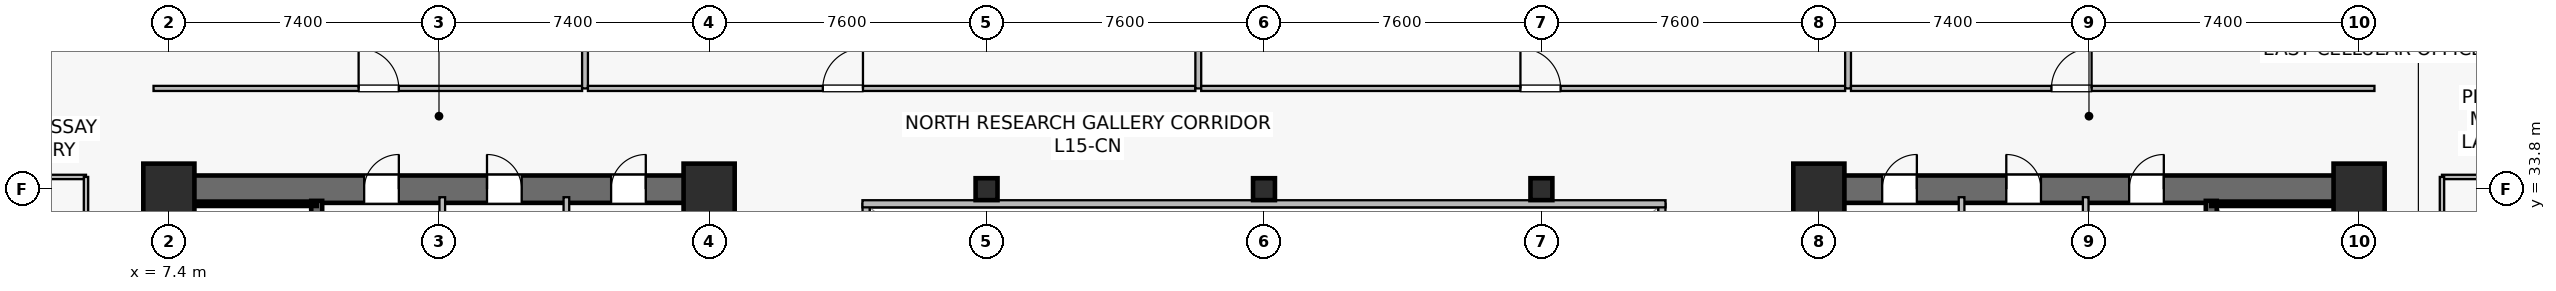
"""IFC4 building model, lengths in metres.
Left out: names, types, materials, properties, quantities, classifications, styles, units other than length and angle.
Written with IfcOpenShell. Run it as: python <this file> out.ifc"""

import sys

from ifc_helpers import new_model, si_unit, direction, frame, frame_2d, origin, origin_2d, place, context, subcontext, project, spatial, rectangle, hollow_rectangle, extrude, source, transform, mapped, element, fill, save


model = new_model("IFC4")
c1 = context("Model", 3, precision=1e-05, world=origin(), true_north=direction((0.0, 1.0)))
c2 = subcontext(c1, "Body", "Model", "MODEL_VIEW")
j1 = project(units=[si_unit("LENGTHUNIT", "METRE"), si_unit("PLANEANGLEUNIT", "RADIAN")], contexts=[c1])
p1 = place(None, origin())
s1 = spatial("IfcSite", under=j1, at=p1, CompositionType="ELEMENT")
p2 = place(p1, origin())
s2 = spatial("IfcBuilding", under=s1, at=p2, CompositionType="ELEMENT")
p3 = place(p2, frame((0.0, 0.0, 62.1)))
s3 = spatial("IfcBuildingStorey", under=s2, at=p3, CompositionType="ELEMENT", Elevation=62.1)
p4 = place(p3, frame((7.025, 33.8, 0.0), z_axis=(0.0, 0.0, 1.0), x_axis=(1.0, 0.0, 0.0)))
e1 = element("IfcWall", 1, at=p4, inside=s3, PredefinedType="SHEAR", context=c2, shape_type="SweptSolid", body=[
    extrude(rectangle(XDim=15.55, YDim=0.75, at=frame_2d((7.775, 0.0))), origin(), (0.0, 0.0, 1.0), 3.78),
])
p5 = place(p4, frame((5.725, 0.0, 0.0)))
e2 = element("IfcOpeningElement", 2, at=p5, cuts=e1, PredefinedType="OPENING", context=c2, shape_type="SweptSolid", body=[
    extrude(rectangle(XDim=0.95, YDim=2.15, at=frame_2d((0.475, 1.075))), frame((0.0, 0.385, 0.0), z_axis=(0.0, -1.0, 0.0), x_axis=(1.0, 0.0, 0.0)), (0.0, 0.0, 1.0), 0.77),
])
p6 = place(p4, frame((9.09, 0.0, 0.0)))
e3 = element("IfcOpeningElement", 3, at=p6, cuts=e1, PredefinedType="OPENING", context=c2, shape_type="SweptSolid", body=[
    extrude(rectangle(XDim=0.95, YDim=2.15, at=frame_2d((0.475, 1.075))), frame((0.0, 0.385, 0.0), z_axis=(0.0, -1.0, 0.0), x_axis=(1.0, 0.0, 0.0)), (0.0, 0.0, 1.0), 0.77),
])
p7 = place(p4, frame((12.49, 0.0, 0.0)))
e4 = element("IfcOpeningElement", 4, at=p7, cuts=e1, PredefinedType="OPENING", context=c2, shape_type="SweptSolid", body=[
    extrude(rectangle(XDim=0.95, YDim=2.15, at=frame_2d((0.475, 1.075))), frame((0.0, 0.385, 0.0), z_axis=(0.0, -1.0, 0.0), x_axis=(1.0, 0.0, 0.0)), (0.0, 0.0, 1.0), 0.77),
])
p8 = place(p3, frame((7.4, 15.175, 0.0), z_axis=(0.0, 0.0, 1.0), x_axis=(0.0, 1.0, 0.0)))
e5 = element("IfcWall", 5, at=p8, inside=s3, PredefinedType="SHEAR", context=c2, shape_type="SweptSolid", body=[
    extrude(rectangle(XDim=18.25, YDim=0.75, at=frame_2d((9.125, 0.0))), origin(), (0.0, 0.0, 1.0), 3.78),
])
p9 = place(p3, frame((22.2, 15.175, 0.0), z_axis=(0.0, 0.0, 1.0), x_axis=(0.0, 1.0, 0.0)))
e6 = element("IfcWall", 6, at=p9, inside=s3, PredefinedType="SHEAR", context=c2, shape_type="SweptSolid", body=[
    extrude(rectangle(XDim=18.25, YDim=0.75, at=frame_2d((9.125, 0.0))), origin(), (0.0, 0.0, 1.0), 3.78),
])
p10 = place(p9, frame((3.375, 0.0, 0.0)))
e7 = element("IfcOpeningElement", 7, at=p10, cuts=e6, PredefinedType="OPENING", context=c2, shape_type="SweptSolid", body=[
    extrude(rectangle(XDim=1.42, YDim=2.2, at=frame_2d((0.71, 1.1))), frame((0.0, 0.385, 0.0), z_axis=(0.0, -1.0, 0.0), x_axis=(1.0, 0.0, 0.0)), (0.0, 0.0, 1.0), 0.77),
])
p11 = place(p3, frame((11.45, 24.85, 0.0), z_axis=(0.0, 0.0, 1.0), x_axis=(0.0, 1.0, 0.0)))
e8 = element("IfcWall", 8, at=p11, inside=s3, PredefinedType="SHEAR", context=c2, shape_type="SweptSolid", body=[
    extrude(rectangle(XDim=8.63, YDim=0.3, at=frame_2d((4.315, 0.0))), origin(), (0.0, 0.0, 1.0), 3.78),
])
p12 = place(p11, frame((0.42, 0.0, 0.0)))
e9 = element("IfcOpeningElement", 9, at=p12, cuts=e8, PredefinedType="OPENING", context=c2, shape_type="SweptSolid", body=[
    extrude(rectangle(XDim=1.1, YDim=2.15, at=frame_2d((0.55, 1.075))), frame((0.0, 0.16, 0.0), z_axis=(0.0, -1.0, 0.0), x_axis=(1.0, 0.0, 0.0)), (0.0, 0.0, 1.0), 0.32),
])
p13 = place(p3, frame((7.73, 33.4, 0.0), z_axis=(0.0, 0.0, 1.0), x_axis=(1.0, 0.0, 0.0)))
e10 = element("IfcWall", 10, at=p13, inside=s3, PredefinedType="SOLIDWALL", context=c2, shape_type="SweptSolid", body=[
    extrude(rectangle(XDim=3.72, YDim=0.12, at=frame_2d((1.86, 0.0))), origin(), (0.0, 0.0, 1.0), 3.78),
])
p14 = place(p3, frame((52.225, 33.8, 0.0), z_axis=(0.0, 0.0, 1.0), x_axis=(1.0, 0.0, 0.0)))
e11 = element("IfcWall", 11, at=p14, inside=s3, PredefinedType="SHEAR", context=c2, shape_type="SweptSolid", body=[
    extrude(rectangle(XDim=15.55, YDim=0.75, at=frame_2d((7.775, 0.0))), origin(), (0.0, 0.0, 1.0), 3.78),
])
p15 = place(p14, frame((8.875, 0.0, 0.0)))
e12 = element("IfcOpeningElement", 12, at=p15, cuts=e11, PredefinedType="OPENING", context=c2, shape_type="SweptSolid", body=[
    extrude(rectangle(XDim=0.95, YDim=2.15, at=frame_2d((0.475, 1.075))), frame((0.0, 0.385, 0.0), z_axis=(0.0, -1.0, 0.0), x_axis=(1.0, 0.0, 0.0)), (0.0, 0.0, 1.0), 0.77),
])
p16 = place(p14, frame((5.51, 0.0, 0.0)))
e13 = element("IfcOpeningElement", 13, at=p16, cuts=e11, PredefinedType="OPENING", context=c2, shape_type="SweptSolid", body=[
    extrude(rectangle(XDim=0.95, YDim=2.15, at=frame_2d((0.475, 1.075))), frame((0.0, 0.385, 0.0), z_axis=(0.0, -1.0, 0.0), x_axis=(1.0, 0.0, 0.0)), (0.0, 0.0, 1.0), 0.77),
])
p17 = place(p14, frame((2.11, 0.0, 0.0)))
e14 = element("IfcOpeningElement", 14, at=p17, cuts=e11, PredefinedType="OPENING", context=c2, shape_type="SweptSolid", body=[
    extrude(rectangle(XDim=0.95, YDim=2.15, at=frame_2d((0.475, 1.075))), frame((0.0, 0.385, 0.0), z_axis=(0.0, -1.0, 0.0), x_axis=(1.0, 0.0, 0.0)), (0.0, 0.0, 1.0), 0.77),
])
p18 = place(p3, frame((52.6, 15.175, 0.0), z_axis=(0.0, 0.0, 1.0), x_axis=(0.0, 1.0, 0.0)))
e15 = element("IfcWall", 15, at=p18, inside=s3, PredefinedType="SHEAR", context=c2, shape_type="SweptSolid", body=[
    extrude(rectangle(XDim=18.25, YDim=0.75, at=frame_2d((9.125, 0.0))), origin(), (0.0, 0.0, 1.0), 3.78),
])
p19 = place(p18, frame((3.375, 0.0, 0.0)))
e16 = element("IfcOpeningElement", 16, at=p19, cuts=e15, PredefinedType="OPENING", context=c2, shape_type="SweptSolid", body=[
    extrude(rectangle(XDim=1.42, YDim=2.2, at=frame_2d((0.71, 1.1))), frame((0.0, 0.385, 0.0), z_axis=(0.0, -1.0, 0.0), x_axis=(1.0, 0.0, 0.0)), (0.0, 0.0, 1.0), 0.77),
])
p20 = place(p3, frame((67.4, 15.175, 0.0), z_axis=(0.0, 0.0, 1.0), x_axis=(0.0, 1.0, 0.0)))
e17 = element("IfcWall", 17, at=p20, inside=s3, PredefinedType="SHEAR", context=c2, shape_type="SweptSolid", body=[
    extrude(rectangle(XDim=18.25, YDim=0.75, at=frame_2d((9.125, 0.0))), origin(), (0.0, 0.0, 1.0), 3.78),
])
p21 = place(p3, frame((63.35, 24.85, 0.0), z_axis=(0.0, 0.0, 1.0), x_axis=(0.0, 1.0, 0.0)))
e18 = element("IfcWall", 18, at=p21, inside=s3, PredefinedType="SHEAR", context=c2, shape_type="SweptSolid", body=[
    extrude(rectangle(XDim=8.63, YDim=0.3, at=frame_2d((4.315, 0.0))), origin(), (0.0, 0.0, 1.0), 3.78),
])
p22 = place(p21, frame((0.42, 0.0, 0.0)))
e19 = element("IfcOpeningElement", 19, at=p22, cuts=e18, PredefinedType="OPENING", context=c2, shape_type="SweptSolid", body=[
    extrude(rectangle(XDim=1.1, YDim=2.15, at=frame_2d((0.55, 1.075))), frame((0.0, 0.16, 0.0), z_axis=(0.0, -1.0, 0.0), x_axis=(1.0, 0.0, 0.0)), (0.0, 0.0, 1.0), 0.32),
])
p23 = place(p3, frame((63.35, 33.4, 0.0), z_axis=(0.0, 0.0, 1.0), x_axis=(1.0, 0.0, 0.0)))
e20 = element("IfcWall", 20, at=p23, inside=s3, PredefinedType="SOLIDWALL", context=c2, shape_type="SweptSolid", body=[
    extrude(rectangle(XDim=3.72, YDim=0.12, at=frame_2d((1.86, 0.0))), origin(), (0.0, 0.0, 1.0), 3.78),
])
m1 = source(origin(), c2, "Body", "SweptSolid", [
    extrude(rectangle(XDim=1.4, YDim=1.4, at=origin_2d()), origin(), (0.0, 0.0, 1.0), 4.1),
])
for number, where, z_axis, x_axis in (
    (21, (7.4, 33.8, 0.0), (0.0, 0.0, 1.0), (1.0, 0.0, 0.0)),
    (22, (22.2, 33.8, 0.0), (0.0, 0.0, 1.0), (1.0, 0.0, 0.0)),
    (23, (52.6, 33.8, 0.0), (0.0, 0.0, 1.0), (1.0, 0.0, 0.0)),
    (24, (67.4, 33.8, 0.0), (0.0, 0.0, 1.0), (1.0, 0.0, 0.0)),
):
    element("IfcColumn", number, at=place(p3, frame(where, z_axis=z_axis, x_axis=x_axis)), inside=s3, PredefinedType="COLUMN", context=c2, shape_type="MappedRepresentation", body=[
        mapped(m1, transform((0.0, 0.0, 0.0), scale=1.0)),
    ])
m2 = source(origin(), c2, "Body", "SweptSolid", [
    extrude(hollow_rectangle(XDim=0.6, YDim=0.6, WallThickness=0.028, at=origin_2d()), origin(), (0.0, 0.0, 1.0), 4.1),
])
for number, where, z_axis, x_axis in (
    (25, (29.8, 33.8, 0.0), (0.0, 0.0, 1.0), (1.0, 0.0, 0.0)),
    (26, (37.4, 33.8, 0.0), (0.0, 0.0, 1.0), (1.0, 0.0, 0.0)),
    (27, (45.0, 33.8, 0.0), (0.0, 0.0, 1.0), (1.0, 0.0, 0.0)),
):
    element("IfcColumn", number, at=place(p3, frame(where, z_axis=z_axis, x_axis=x_axis)), inside=s3, PredefinedType="COLUMN", context=c2, shape_type="MappedRepresentation", body=[
        mapped(m2, transform((0.0, 0.0, 0.0), scale=1.0)),
    ])
p24 = place(p3, frame((14.89, 29.65, 0.0), z_axis=(0.0, 0.0, 1.0), x_axis=(0.0, 1.0, 0.0)))
e28 = element("IfcWall", 28, at=p24, inside=s3, PredefinedType="PLUMBINGWALL", context=c2, shape_type="SweptSolid", body=[
    extrude(rectangle(XDim=3.93, YDim=0.155, at=frame_2d((1.965, 0.0))), origin(), (0.0, 0.0, 1.0), 3.115),
])
p25 = place(p3, frame((18.29, 29.65, 0.0), z_axis=(0.0, 0.0, 1.0), x_axis=(0.0, 1.0, 0.0)))
e29 = element("IfcWall", 29, at=p25, inside=s3, PredefinedType="PLUMBINGWALL", context=c2, shape_type="SweptSolid", body=[
    extrude(rectangle(XDim=3.93, YDim=0.155, at=frame_2d((1.965, 0.0))), origin(), (0.0, 0.0, 1.0), 3.78),
])
p26 = place(p3, frame((59.91, 29.65, 0.0), z_axis=(0.0, 0.0, 1.0), x_axis=(0.0, 1.0, 0.0)))
e30 = element("IfcWall", 30, at=p26, inside=s3, PredefinedType="PLUMBINGWALL", context=c2, shape_type="SweptSolid", body=[
    extrude(rectangle(XDim=3.93, YDim=0.155, at=frame_2d((1.965, 0.0))), origin(), (0.0, 0.0, 1.0), 3.115),
])
p27 = place(p3, frame((56.51, 29.65, 0.0), z_axis=(0.0, 0.0, 1.0), x_axis=(0.0, 1.0, 0.0)))
e31 = element("IfcWall", 31, at=p27, inside=s3, PredefinedType="PLUMBINGWALL", context=c2, shape_type="SweptSolid", body=[
    extrude(rectangle(XDim=3.93, YDim=0.155, at=frame_2d((1.965, 0.0))), origin(), (0.0, 0.0, 1.0), 3.78),
])
p28 = place(p3, frame((26.5, 15.2, 0.0), z_axis=(0.0, 0.0, 1.0), x_axis=(0.0, 1.0, 0.0)))
e32 = element("IfcWall", 32, at=p28, inside=s3, PredefinedType="SOLIDWALL", context=c2, shape_type="SweptSolid", body=[
    extrude(rectangle(XDim=18.2, YDim=0.195, at=frame_2d((9.1, 0.0))), origin(), (0.0, 0.0, 1.0), 3.78),
])
p29 = place(p28, frame((1.8, 0.0, 0.9)))
e33 = element("IfcOpeningElement", 33, at=p29, cuts=e32, PredefinedType="OPENING", context=c2, shape_type="SweptSolid", body=[
    extrude(rectangle(XDim=1.2, YDim=1.35, at=frame_2d((0.6, 0.675))), frame((0.0, 0.107, 0.0), z_axis=(0.0, -1.0, 0.0), x_axis=(1.0, 0.0, 0.0)), (0.0, 0.0, 1.0), 0.215),
])
p30 = place(p28, frame((13.2, 0.0, 0.9)))
e34 = element("IfcOpeningElement", 34, at=p30, cuts=e32, PredefinedType="OPENING", context=c2, shape_type="SweptSolid", body=[
    extrude(rectangle(XDim=1.2, YDim=1.35, at=frame_2d((0.6, 0.675))), frame((0.0, 0.107, 0.0), z_axis=(0.0, -1.0, 0.0), x_axis=(1.0, 0.0, 0.0)), (0.0, 0.0, 1.0), 0.215),
])
p31 = place(p3, frame((48.3, 15.2, 0.0), z_axis=(0.0, 0.0, 1.0), x_axis=(0.0, 1.0, 0.0)))
e35 = element("IfcWall", 35, at=p31, inside=s3, PredefinedType="SOLIDWALL", context=c2, shape_type="SweptSolid", body=[
    extrude(rectangle(XDim=18.2, YDim=0.195, at=frame_2d((9.1, 0.0))), origin(), (0.0, 0.0, 1.0), 3.78),
])
p32 = place(p31, frame((1.8, 0.0, 0.9)))
e36 = element("IfcOpeningElement", 36, at=p32, cuts=e35, PredefinedType="OPENING", context=c2, shape_type="SweptSolid", body=[
    extrude(rectangle(XDim=1.2, YDim=1.35, at=frame_2d((0.6, 0.675))), frame((0.0, 0.107, 0.0), z_axis=(0.0, -1.0, 0.0), x_axis=(1.0, 0.0, 0.0)), (0.0, 0.0, 1.0), 0.215),
])
p33 = place(p31, frame((13.2, 0.0, 0.9)))
e37 = element("IfcOpeningElement", 37, at=p33, cuts=e35, PredefinedType="OPENING", context=c2, shape_type="SweptSolid", body=[
    extrude(rectangle(XDim=1.2, YDim=1.35, at=frame_2d((0.6, 0.675))), frame((0.0, 0.107, 0.0), z_axis=(0.0, -1.0, 0.0), x_axis=(1.0, 0.0, 0.0)), (0.0, 0.0, 1.0), 0.215),
])
p34 = place(p3, frame((26.4, 33.4, 0.0), z_axis=(0.0, 0.0, 1.0), x_axis=(1.0, 0.0, 0.0)))
e38 = element("IfcWall", 38, at=p34, inside=s3, PredefinedType="SOLIDWALL", context=c2, shape_type="SweptSolid", body=[
    extrude(rectangle(XDim=22.0, YDim=0.195, at=frame_2d((11.0, 0.0))), origin(), (0.0, 0.0, 1.0), 3.78),
])
p35 = place(p3, frame((6.98, 36.56, 0.0), z_axis=(0.0, 0.0, 1.0), x_axis=(1.0, 0.0, 0.0)))
e39 = element("IfcWall", 39, at=p35, inside=s3, PredefinedType="PARTITIONING", context=c2, shape_type="SweptSolid", body=[
    extrude(rectangle(XDim=11.74, YDim=0.14, at=frame_2d((5.87, 0.0))), origin(), (0.0, 0.0, 1.0), 3.115),
])
p36 = place(p35, frame((5.618, 0.0, 0.0)))
e40 = element("IfcOpeningElement", 40, at=p36, cuts=e39, PredefinedType="OPENING", context=c2, shape_type="SweptSolid", body=[
    extrude(rectangle(XDim=1.1, YDim=2.18, at=frame_2d((0.55, 1.09))), frame((0.0, 0.08, 0.0), z_axis=(0.0, -1.0, 0.0), x_axis=(1.0, 0.0, 0.0)), (0.0, 0.0, 1.0), 0.16),
])
p37 = place(p3, frame((18.8, 36.56, 0.0), z_axis=(0.0, 0.0, 1.0), x_axis=(0.0, 1.0, 0.0)))
e41 = element("IfcWall", 41, at=p37, inside=s3, PredefinedType="PARTITIONING", context=c2, shape_type="SweptSolid", body=[
    extrude(rectangle(XDim=11.93, YDim=0.16, at=frame_2d((5.965, 0.0))), origin(), (0.0, 0.0, 1.0), 3.015),
])
p38 = place(p3, frame((18.88, 36.56, 0.0), z_axis=(0.0, 0.0, 1.0), x_axis=(1.0, 0.0, 0.0)))
e42 = element("IfcWall", 42, at=p38, inside=s3, PredefinedType="PARTITIONING", context=c2, shape_type="SweptSolid", body=[
    extrude(rectangle(XDim=16.64, YDim=0.14, at=frame_2d((8.32, 0.0))), origin(), (0.0, 0.0, 1.0), 3.115),
])
p39 = place(p38, frame((6.434, 0.0, 0.0)))
e43 = element("IfcOpeningElement", 43, at=p39, cuts=e42, PredefinedType="OPENING", context=c2, shape_type="SweptSolid", body=[
    extrude(rectangle(XDim=1.1, YDim=2.18, at=frame_2d((0.55, 1.09))), frame((0.0, 0.08, 0.0), z_axis=(0.0, -1.0, 0.0), x_axis=(1.0, 0.0, 0.0)), (0.0, 0.0, 1.0), 0.16),
])
p40 = place(p3, frame((35.6, 36.56, 0.0), z_axis=(0.0, 0.0, 1.0), x_axis=(0.0, 1.0, 0.0)))
e44 = element("IfcWall", 44, at=p40, inside=s3, PredefinedType="PARTITIONING", context=c2, shape_type="SweptSolid", body=[
    extrude(rectangle(XDim=10.73, YDim=0.16, at=frame_2d((5.365, 0.0))), origin(), (0.0, 0.0, 1.0), 3.015),
])
p41 = place(p3, frame((35.68, 36.56, 0.0), z_axis=(0.0, 0.0, 1.0), x_axis=(1.0, 0.0, 0.0)))
e45 = element("IfcWall", 45, at=p41, inside=s3, PredefinedType="PARTITIONING", context=c2, shape_type="SweptSolid", body=[
    extrude(rectangle(XDim=17.64, YDim=0.14, at=frame_2d((8.82, 0.0))), origin(), (0.0, 0.0, 1.0), 3.115),
])
p42 = place(p41, frame((8.745, 0.0, 0.0)))
e46 = element("IfcOpeningElement", 46, at=p42, cuts=e45, PredefinedType="OPENING", context=c2, shape_type="SweptSolid", body=[
    extrude(rectangle(XDim=1.1, YDim=2.18, at=frame_2d((0.55, 1.09))), frame((0.0, 0.08, 0.0), z_axis=(0.0, -1.0, 0.0), x_axis=(1.0, 0.0, 0.0)), (0.0, 0.0, 1.0), 0.16),
])
p43 = place(p3, frame((53.4, 36.56, 0.0), z_axis=(0.0, 0.0, 1.0), x_axis=(0.0, 1.0, 0.0)))
e47 = element("IfcWall", 47, at=p43, inside=s3, PredefinedType="PARTITIONING", context=c2, shape_type="SweptSolid", body=[
    extrude(rectangle(XDim=11.93, YDim=0.16, at=frame_2d((5.965, 0.0))), origin(), (0.0, 0.0, 1.0), 3.015),
])
p44 = place(p3, frame((53.48, 36.56, 0.0), z_axis=(0.0, 0.0, 1.0), x_axis=(1.0, 0.0, 0.0)))
e48 = element("IfcWall", 48, at=p44, inside=s3, PredefinedType="PARTITIONING", context=c2, shape_type="SweptSolid", body=[
    extrude(rectangle(XDim=14.34, YDim=0.14, at=frame_2d((7.17, 0.0))), origin(), (0.0, 0.0, 1.0), 3.115),
])
p45 = place(p44, frame((5.491, 0.0, 0.0)))
e49 = element("IfcOpeningElement", 49, at=p45, cuts=e48, PredefinedType="OPENING", context=c2, shape_type="SweptSolid", body=[
    extrude(rectangle(XDim=1.1, YDim=2.18, at=frame_2d((0.55, 1.09))), frame((0.0, 0.08, 0.0), z_axis=(0.0, -1.0, 0.0), x_axis=(1.0, 0.0, 0.0)), (0.0, 0.0, 1.0), 0.16),
])
p46 = place(p3, frame((0.11, 34.135, 0.0), z_axis=(0.0, 0.0, 1.0), x_axis=(1.0, 0.0, 0.0)))
e50 = element("IfcWall", 50, at=p46, inside=s3, PredefinedType="PARTITIONING", context=c2, shape_type="SweptSolid", body=[
    extrude(rectangle(XDim=5.02, YDim=0.12, at=frame_2d((2.51, 0.0))), origin(), (0.0, 0.0, 1.0), 3.78),
])
p47 = place(p3, frame((5.13, 28.66, 0.0), z_axis=(0.0, 0.0, 1.0), x_axis=(0.0, 1.0, 0.0)))
e51 = element("IfcWall", 51, at=p47, inside=s3, PredefinedType="PARTITIONING", context=c2, shape_type="SweptSolid", body=[
    extrude(rectangle(XDim=5.475, YDim=0.12, at=frame_2d((2.738, 0.0))), origin(), (0.0, 0.0, 1.0), 3.78),
])
p48 = place(p47, frame((2.288, 0.0, 0.0)))
e52 = element("IfcOpeningElement", 52, at=p48, cuts=e51, PredefinedType="OPENING", context=c2, shape_type="SweptSolid", body=[
    extrude(rectangle(XDim=0.9, YDim=2.1, at=frame_2d((0.45, 1.05))), frame((0.0, 0.07, 0.0), z_axis=(0.0, -1.0, 0.0), x_axis=(1.0, 0.0, 0.0)), (0.0, 0.0, 1.0), 0.14),
])
p49 = place(p3, frame((69.67, 34.135, 0.0), z_axis=(0.0, 0.0, 1.0), x_axis=(1.0, 0.0, 0.0)))
e53 = element("IfcWall", 53, at=p49, inside=s3, PredefinedType="PARTITIONING", context=c2, shape_type="SweptSolid", body=[
    extrude(rectangle(XDim=5.02, YDim=0.12, at=frame_2d((2.51, 0.0))), origin(), (0.0, 0.0, 1.0), 3.78),
])
p50 = place(p3, frame((69.67, 29.46, 0.0), z_axis=(0.0, 0.0, 1.0), x_axis=(0.0, 1.0, 0.0)))
e54 = element("IfcWall", 54, at=p50, inside=s3, PredefinedType="PARTITIONING", context=c2, shape_type="SweptSolid", body=[
    extrude(rectangle(XDim=4.675, YDim=0.12, at=frame_2d((2.337, 0.0))), origin(), (0.0, 0.0, 1.0), 3.78),
])
p51 = place(p50, frame((1.887, 0.0, 0.0)))
e55 = element("IfcOpeningElement", 55, at=p51, cuts=e54, PredefinedType="OPENING", context=c2, shape_type="SweptSolid", body=[
    extrude(rectangle(XDim=0.9, YDim=2.1, at=frame_2d((0.45, 1.05))), frame((0.0, 0.07, 0.0), z_axis=(0.0, -1.0, 0.0), x_axis=(1.0, 0.0, 0.0)), (0.0, 0.0, 1.0), 0.14),
])
m3 = source(origin(), c2, "Body", "SweptSolid", [
    extrude(rectangle(XDim=0.95, YDim=2.15, at=frame_2d((0.475, 1.075))), frame((0.0, 0.025, 0.0), z_axis=(0.0, -1.0, 0.0), x_axis=(1.0, 0.0, 0.0)), (0.0, 0.0, 1.0), 0.05),
])
p52 = place(p5, origin())
e56 = element("IfcDoor", 56, at=p52, inside=s3, OperationType="SINGLE_SWING_RIGHT", PredefinedType="DOOR", context=c2, shape_type="MappedRepresentation", body=[
    mapped(m3, transform((0.0, 0.0, 0.0), scale=1.0)),
])
fill(e2, e56)
p53 = place(p6, origin())
e57 = element("IfcDoor", 57, at=p53, inside=s3, OperationType="SINGLE_SWING_LEFT", PredefinedType="DOOR", context=c2, shape_type="MappedRepresentation", body=[
    mapped(m3, transform((0.0, 0.0, 0.0), scale=1.0)),
])
fill(e3, e57)
p54 = place(p7, origin())
e58 = element("IfcDoor", 58, at=p54, inside=s3, OperationType="SINGLE_SWING_RIGHT", PredefinedType="DOOR", context=c2, shape_type="MappedRepresentation", body=[
    mapped(m3, transform((0.0, 0.0, 0.0), scale=1.0)),
])
fill(e4, e58)
p55 = place(p15, origin())
e59 = element("IfcDoor", 59, at=p55, inside=s3, OperationType="SINGLE_SWING_RIGHT", PredefinedType="DOOR", context=c2, shape_type="MappedRepresentation", body=[
    mapped(m3, transform((0.0, 0.0, 0.0), scale=1.0)),
])
fill(e12, e59)
p56 = place(p16, origin())
e60 = element("IfcDoor", 60, at=p56, inside=s3, OperationType="SINGLE_SWING_LEFT", PredefinedType="DOOR", context=c2, shape_type="MappedRepresentation", body=[
    mapped(m3, transform((0.0, 0.0, 0.0), scale=1.0)),
])
fill(e13, e60)
p57 = place(p17, origin())
e61 = element("IfcDoor", 61, at=p57, inside=s3, OperationType="SINGLE_SWING_RIGHT", PredefinedType="DOOR", context=c2, shape_type="MappedRepresentation", body=[
    mapped(m3, transform((0.0, 0.0, 0.0), scale=1.0)),
])
fill(e14, e61)
m4 = source(origin(), c2, "Body", "SweptSolid", [
    extrude(rectangle(XDim=1.1, YDim=2.18, at=frame_2d((0.55, 1.09))), frame((0.0, 0.025, 0.0), z_axis=(0.0, -1.0, 0.0), x_axis=(1.0, 0.0, 0.0)), (0.0, 0.0, 1.0), 0.05),
])
p58 = place(p36, origin())
e62 = element("IfcDoor", 62, at=p58, inside=s3, OperationType="SINGLE_SWING_LEFT", PredefinedType="DOOR", context=c2, shape_type="MappedRepresentation", body=[
    mapped(m4, transform((0.0, 0.0, 0.0), scale=1.0)),
])
fill(e40, e62)
p59 = place(p39, origin())
e63 = element("IfcDoor", 63, at=p59, inside=s3, OperationType="SINGLE_SWING_RIGHT", PredefinedType="DOOR", context=c2, shape_type="MappedRepresentation", body=[
    mapped(m4, transform((0.0, 0.0, 0.0), scale=1.0)),
])
fill(e43, e63)
p60 = place(p42, origin())
e64 = element("IfcDoor", 64, at=p60, inside=s3, OperationType="SINGLE_SWING_LEFT", PredefinedType="DOOR", context=c2, shape_type="MappedRepresentation", body=[
    mapped(m4, transform((0.0, 0.0, 0.0), scale=1.0)),
])
fill(e46, e64)
p61 = place(p45, origin())
e65 = element("IfcDoor", 65, at=p61, inside=s3, OperationType="SINGLE_SWING_RIGHT", PredefinedType="DOOR", context=c2, shape_type="MappedRepresentation", body=[
    mapped(m4, transform((0.0, 0.0, 0.0), scale=1.0)),
])
fill(e49, e65)
save(model, sys.argv[1])
